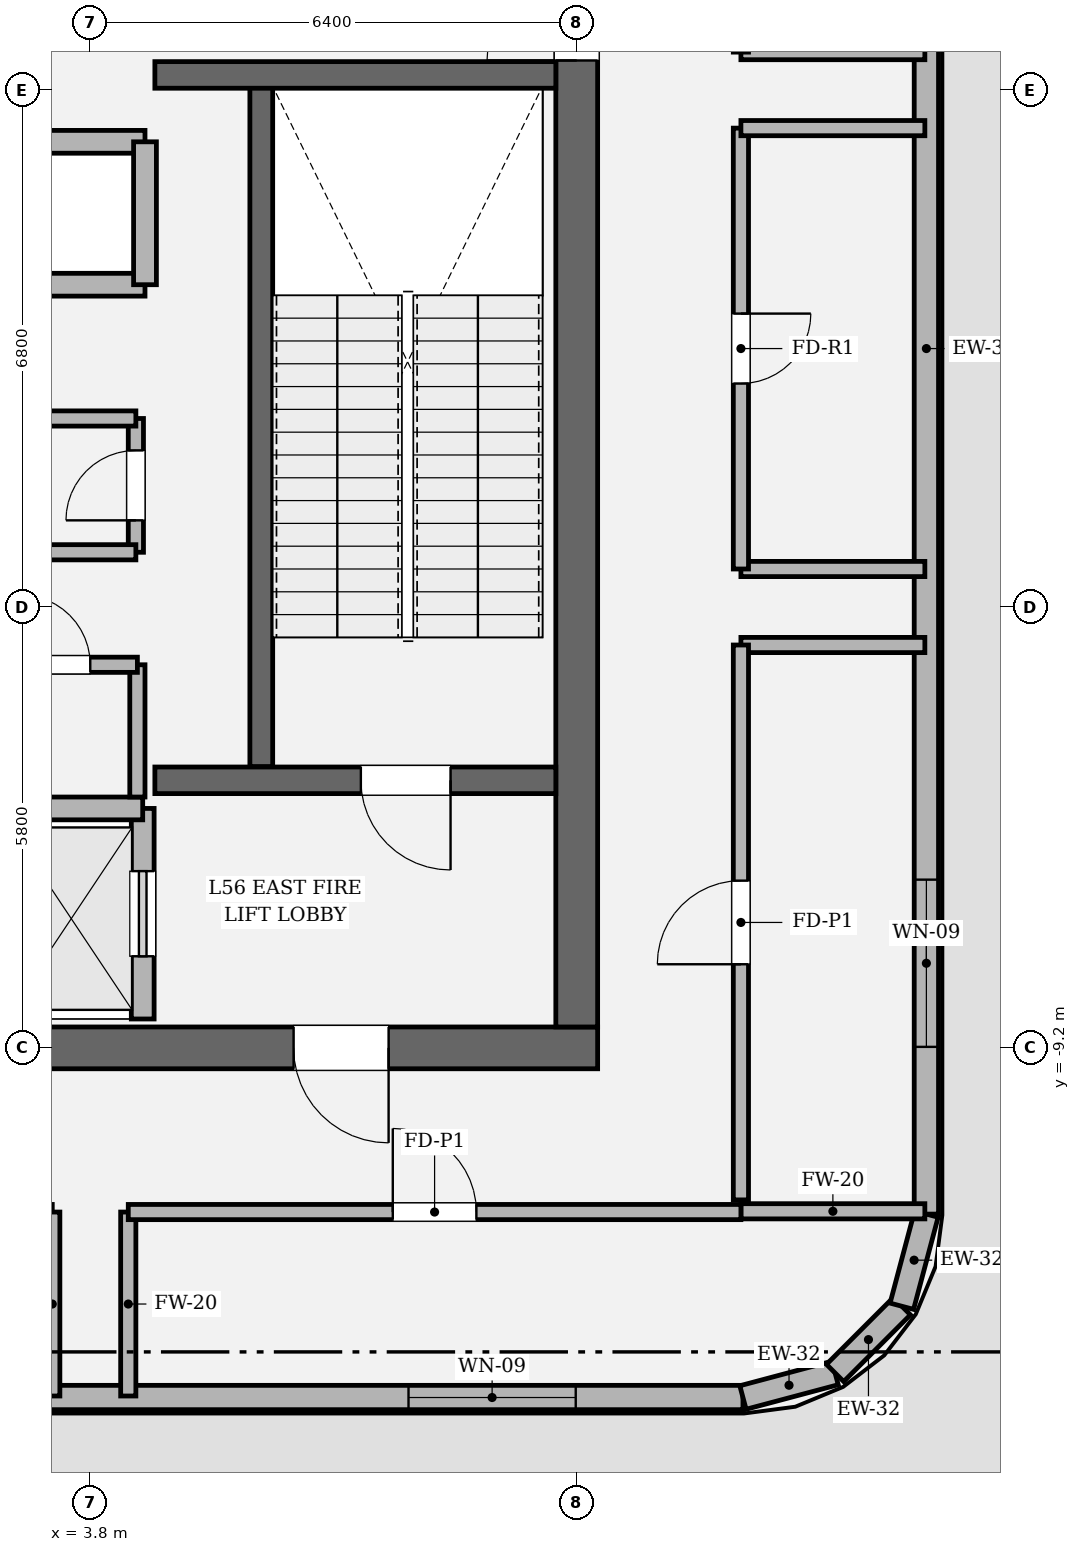
"""IFC4 building model, lengths in metres.
Left out: names, types, materials, properties, quantities, classifications, styles, units other than length and angle.
Written with IfcOpenShell. Run it as: python <this file> out.ifc"""

import sys

from ifc_helpers import new_model, si_unit, direction, frame, frame_2d, origin, place, context, subcontext, project, spatial, rectangle, extrude, element, fill, save


model = new_model("IFC4")
c1 = context("Model", 3, precision=1e-05, world=origin(), true_north=direction((0.0, 1.0)))
c2 = subcontext(c1, "Body", "Model", "MODEL_VIEW")
j1 = project(units=[si_unit("LENGTHUNIT", "METRE"), si_unit("PLANEANGLEUNIT", "RADIAN")], contexts=[c1])
p1 = place(None, origin())
s1 = spatial("IfcSite", under=j1, at=p1, CompositionType="ELEMENT")
p2 = place(p1, origin())
s2 = spatial("IfcBuilding", under=s1, at=p2, CompositionType="ELEMENT")
p3 = place(p2, frame((0.0, 0.0, 237.0)))
s3 = spatial("IfcBuildingStorey", under=s2, at=p3, CompositionType="ELEMENT", Elevation=237.0)
p4 = place(p3, frame((10.475, -9.2, 0.0), z_axis=(0.0, 0.0, 1.0), x_axis=(-1.0, 0.0, 0.0)))
e1 = element("IfcWall", 1, at=p4, inside=s3, PredefinedType="SHEAR", context=c2, shape_type="SweptSolid", body=[
    extrude(rectangle(XDim=20.95, YDim=0.55, at=frame_2d((10.475, 0.0))), origin(), (0.0, 0.0, 1.0), 4.8),
])
p5 = place(p4, frame((2.75, 0.0, 0.0)))
e2 = element("IfcOpeningElement", 2, at=p5, cuts=e1, PredefinedType="OPENING", context=c2, shape_type="SweptSolid", body=[
    extrude(rectangle(XDim=1.25, YDim=2.25, at=frame_2d((0.625, 1.125))), frame((0.0, 0.285, 0.0), z_axis=(0.0, -1.0, 0.0), x_axis=(1.0, 0.0, 0.0)), (0.0, 0.0, 1.0), 0.57),
])
p6 = place(p4, frame((16.95, 0.0, 0.0)))
e3 = element("IfcOpeningElement", 3, at=p6, cuts=e1, PredefinedType="OPENING", context=c2, shape_type="SweptSolid", body=[
    extrude(rectangle(XDim=1.25, YDim=2.25, at=frame_2d((0.625, 1.125))), frame((0.0, 0.285, 0.0), z_axis=(0.0, -1.0, 0.0), x_axis=(1.0, 0.0, 0.0)), (0.0, 0.0, 1.0), 0.57),
])
p7 = place(p3, frame((10.2, 8.925, 0.0), z_axis=(0.0, 0.0, 1.0), x_axis=(0.0, -1.0, 0.0)))
e4 = element("IfcWall", 4, at=p7, inside=s3, PredefinedType="SHEAR", context=c2, shape_type="SweptSolid", body=[
    extrude(rectangle(XDim=17.85, YDim=0.55, at=frame_2d((8.925, 0.0))), origin(), (0.0, 0.0, 1.0), 4.8),
])
p8 = place(p7, frame((3.955, 0.0, 0.0)))
e5 = element("IfcOpeningElement", 5, at=p8, cuts=e4, PredefinedType="OPENING", context=c2, shape_type="SweptSolid", body=[
    extrude(rectangle(XDim=1.18, YDim=2.2, at=frame_2d((0.59, 1.1))), frame((0.0, 0.285, 0.0), z_axis=(0.0, -1.0, 0.0), x_axis=(1.0, 0.0, 0.0)), (0.0, 0.0, 1.0), 0.57),
])
p9 = place(p3, frame((6.05, 3.45, 0.0), z_axis=(0.0, 0.0, 1.0), x_axis=(0.0, -1.0, 0.0)))
e6 = element("IfcWall", 6, at=p9, inside=s3, PredefinedType="SOLIDWALL", context=c2, shape_type="SweptSolid", body=[
    extrude(rectangle(XDim=8.95, YDim=0.3, at=frame_2d((4.475, 0.0))), origin(), (0.0, 0.0, 1.0), 4.8),
])
p10 = place(p3, frame((4.65, -5.68, 0.0), z_axis=(0.0, 0.0, 1.0), x_axis=(1.0, 0.0, 0.0)))
e7 = element("IfcWall", 7, at=p10, inside=s3, PredefinedType="SOLIDWALL", context=c2, shape_type="SweptSolid", body=[
    extrude(rectangle(XDim=5.275, YDim=0.35, at=frame_2d((2.638, 0.0))), origin(), (0.0, 0.0, 1.0), 4.8),
])
p11 = place(p10, frame((2.71, 0.0, 0.0)))
e8 = element("IfcOpeningElement", 8, at=p11, cuts=e7, PredefinedType="OPENING", context=c2, shape_type="SweptSolid", body=[
    extrude(rectangle(XDim=1.18, YDim=2.2, at=frame_2d((0.59, 1.1))), frame((0.0, 0.185, 0.0), z_axis=(0.0, -1.0, 0.0), x_axis=(1.0, 0.0, 0.0)), (0.0, 0.0, 1.0), 0.37),
])
p12 = place(p3, frame((4.65, 3.6, 0.0), z_axis=(0.0, 0.0, 1.0), x_axis=(1.0, 0.0, 0.0)))
e9 = element("IfcWall", 9, at=p12, inside=s3, PredefinedType="SOLIDWALL", context=c2, shape_type="SweptSolid", body=[
    extrude(rectangle(XDim=5.275, YDim=0.35, at=frame_2d((2.638, 0.0))), origin(), (0.0, 0.0, 1.0), 4.8),
])
p13 = place(p3, frame((-12.387, -13.8, 0.0), z_axis=(0.0, 0.0, 1.0), x_axis=(1.0, 0.0, 0.0)))
e10 = element("IfcWall", 10, at=p13, inside=s3, PredefinedType="SOLIDWALL", context=c2, shape_type="SweptSolid", body=[
    extrude(rectangle(XDim=24.774, YDim=0.32, at=frame_2d((12.387, 0.0))), origin(), (0.0, 0.0, 1.0), 3.194),
])
p14 = place(p13, frame((2.2, 0.0, 0.9)))
e11 = element("IfcOpeningElement", 11, at=p14, cuts=e10, PredefinedType="OPENING", context=c2, shape_type="SweptSolid", body=[
    extrude(rectangle(XDim=2.2, YDim=1.2, at=frame_2d((1.1, 0.6))), frame((0.0, 0.17, 0.0), z_axis=(0.0, -1.0, 0.0), x_axis=(1.0, 0.0, 0.0)), (0.0, 0.0, 1.0), 0.34),
])
p15 = place(p13, frame((20.374, 0.0, 0.9)))
e12 = element("IfcOpeningElement", 12, at=p15, cuts=e10, PredefinedType="OPENING", context=c2, shape_type="SweptSolid", body=[
    extrude(rectangle(XDim=2.2, YDim=1.2, at=frame_2d((1.1, 0.6))), frame((0.0, 0.17, 0.0), z_axis=(0.0, -1.0, 0.0), x_axis=(1.0, 0.0, 0.0)), (0.0, 0.0, 1.0), 0.34),
])
p16 = place(p3, frame((12.387, -13.8, 0.0), z_axis=(0.0, 0.0, 1.0), x_axis=(0.966283375382, 0.25748094776, 0.0)))
e13 = element("IfcWall", 13, at=p16, inside=s3, PredefinedType="SOLIDWALL", context=c2, shape_type="SweptSolid", body=[
    extrude(rectangle(XDim=1.254, YDim=0.32, at=frame_2d((0.627, 0.0))), origin(), (0.0, 0.0, 1.0), 3.194),
])
p17 = place(p3, frame((13.599, -13.477, 0.0), z_axis=(0.0, 0.0, 1.0), x_axis=(0.707106781187, 0.707106781187, 0.0)))
e14 = element("IfcWall", 14, at=p17, inside=s3, PredefinedType="SOLIDWALL", context=c2, shape_type="SweptSolid", body=[
    extrude(rectangle(XDim=1.242, YDim=0.32, at=frame_2d((0.621, 0.0))), origin(), (0.0, 0.0, 1.0), 3.194),
])
p18 = place(p3, frame((14.477, -12.599, 0.0), z_axis=(0.0, 0.0, 1.0), x_axis=(0.25748094776, 0.966283375382, 0.0)))
e15 = element("IfcWall", 15, at=p18, inside=s3, PredefinedType="SOLIDWALL", context=c2, shape_type="SweptSolid", body=[
    extrude(rectangle(XDim=1.254, YDim=0.32, at=frame_2d((0.627, 0.0))), origin(), (0.0, 0.0, 1.0), 3.194),
])
p19 = place(p3, frame((14.8, -11.387, 0.0), z_axis=(0.0, 0.0, 1.0), x_axis=(0.0, 1.0, 0.0)))
e16 = element("IfcWall", 16, at=p19, inside=s3, PredefinedType="SOLIDWALL", context=c2, shape_type="SweptSolid", body=[
    extrude(rectangle(XDim=22.774, YDim=0.32, at=frame_2d((11.387, 0.0))), origin(), (0.0, 0.0, 1.0), 3.194),
])
p20 = place(p19, frame((2.2, 0.0, 0.9)))
e17 = element("IfcOpeningElement", 17, at=p20, cuts=e16, PredefinedType="OPENING", context=c2, shape_type="SweptSolid", body=[
    extrude(rectangle(XDim=2.2, YDim=1.2, at=frame_2d((1.1, 0.6))), frame((0.0, 0.17, 0.0), z_axis=(0.0, -1.0, 0.0), x_axis=(1.0, 0.0, 0.0)), (0.0, 0.0, 1.0), 0.34),
])
p21 = place(p19, frame((18.374, 0.0, 0.9)))
e18 = element("IfcOpeningElement", 18, at=p21, cuts=e16, PredefinedType="OPENING", context=c2, shape_type="SweptSolid", body=[
    extrude(rectangle(XDim=2.2, YDim=1.2, at=frame_2d((1.1, 0.6))), frame((0.0, 0.17, 0.0), z_axis=(0.0, -1.0, 0.0), x_axis=(1.0, 0.0, 0.0)), (0.0, 0.0, 1.0), 0.34),
])
p22 = place(p3, frame((4.49, -8.82, 0.0), z_axis=(0.0, 0.0, 1.0), x_axis=(0.0, 1.0, 0.0)))
e19 = element("IfcWall", 19, at=p22, inside=s3, PredefinedType="SOLIDWALL", context=c2, shape_type="SweptSolid", body=[
    extrude(rectangle(XDim=2.77, YDim=0.3, at=frame_2d((1.385, 0.0))), origin(), (0.0, 0.0, 1.0), 4.48),
])
p23 = place(p22, frame((0.825, 0.0, 0.0)))
e20 = element("IfcOpeningElement", 20, at=p23, cuts=e19, PredefinedType="OPENING", context=c2, shape_type="SweptSolid", body=[
    extrude(rectangle(XDim=1.12, YDim=2.25, at=frame_2d((0.56, 1.125))), frame((0.0, 0.16, 0.0), z_axis=(0.0, -1.0, 0.0), x_axis=(1.0, 0.0, 0.0)), (0.0, 0.0, 1.0), 0.32),
])
p24 = place(p3, frame((2.61, -6.05, 0.0), z_axis=(0.0, 0.0, 1.0), x_axis=(1.0, 0.0, 0.0)))
e21 = element("IfcWall", 21, at=p24, inside=s3, PredefinedType="SOLIDWALL", context=c2, shape_type="SweptSolid", body=[
    extrude(rectangle(XDim=1.88, YDim=0.3, at=frame_2d((0.94, 0.0))), origin(), (0.0, 0.0, 1.0), 4.48),
])
for number, where, z_axis, x_axis in (
    (22, (-4.52, 0.84, 0.0), (0.0, 0.0, 1.0), (1.0, 0.0, 0.0)),
    (23, (-4.52, 2.72, 0.0), (0.0, 0.0, 1.0), (1.0, 0.0, 0.0)),
):
    element("IfcWall", number, at=place(p3, frame(where, z_axis=z_axis, x_axis=x_axis)), inside=s3, PredefinedType="SOLIDWALL", context=c2, shape_type="SweptSolid", body=[
        extrude(rectangle(XDim=9.04, YDim=0.3, at=frame_2d((4.52, 0.0))), origin(), (0.0, 0.0, 1.0), 4.48),
    ])
p25 = place(p3, frame((4.52, 0.84, 0.0), z_axis=(0.0, 0.0, 1.0), x_axis=(0.0, 1.0, 0.0)))
e24 = element("IfcWall", 24, at=p25, inside=s3, PredefinedType="SOLIDWALL", context=c2, shape_type="SweptSolid", body=[
    extrude(rectangle(XDim=1.88, YDim=0.3, at=frame_2d((0.94, 0.0))), origin(), (0.0, 0.0, 1.0), 4.48),
])
p26 = place(p3, frame((4.42, -5.9, 0.0), z_axis=(0.0, 0.0, 1.0), x_axis=(0.0, 1.0, 0.0)))
e25 = element("IfcWall", 25, at=p26, inside=s3, PredefinedType="SOLIDWALL", context=c2, shape_type="SweptSolid", body=[
    extrude(rectangle(XDim=1.74, YDim=0.2, at=frame_2d((0.87, 0.0))), origin(), (0.0, 0.0, 1.0), 4.48),
])
p27 = place(p3, frame((4.42, -4.16, 0.0), z_axis=(0.0, 0.0, 1.0), x_axis=(-1.0, 0.0, 0.0)))
e26 = element("IfcWall", 26, at=p27, inside=s3, PredefinedType="SOLIDWALL", context=c2, shape_type="SweptSolid", body=[
    extrude(rectangle(XDim=2.16, YDim=0.2, at=frame_2d((1.08, 0.0))), origin(), (0.0, 0.0, 1.0), 4.48),
])
p28 = place(p27, frame((0.62, 0.0, 0.0)))
e27 = element("IfcOpeningElement", 27, at=p28, cuts=e26, PredefinedType="OPENING", context=c2, shape_type="SweptSolid", body=[
    extrude(rectangle(XDim=0.92, YDim=2.1, at=frame_2d((0.46, 1.05))), frame((0.0, 0.11, 0.0), z_axis=(0.0, -1.0, 0.0), x_axis=(1.0, 0.0, 0.0)), (0.0, 0.0, 1.0), 0.22),
])
p29 = place(p3, frame((4.4, -2.68, 0.0), z_axis=(0.0, 0.0, 1.0), x_axis=(0.0, 1.0, 0.0)))
e28 = element("IfcWall", 28, at=p29, inside=s3, PredefinedType="SOLIDWALL", context=c2, shape_type="SweptSolid", body=[
    extrude(rectangle(XDim=1.76, YDim=0.2, at=frame_2d((0.88, 0.0))), origin(), (0.0, 0.0, 1.0), 4.48),
])
p30 = place(p29, frame((0.42, 0.0, 0.0)))
e29 = element("IfcOpeningElement", 29, at=p30, cuts=e28, PredefinedType="OPENING", context=c2, shape_type="SweptSolid", body=[
    extrude(rectangle(XDim=0.92, YDim=2.1, at=frame_2d((0.46, 1.05))), frame((0.0, 0.11, 0.0), z_axis=(0.0, -1.0, 0.0), x_axis=(1.0, 0.0, 0.0)), (0.0, 0.0, 1.0), 0.22),
])
for number, where, z_axis, x_axis in (
    (30, (4.4, -0.92, 0.0), (0.0, 0.0, 1.0), (-1.0, 0.0, 0.0)),
    (31, (-4.4, -2.68, 0.0), (0.0, 0.0, 1.0), (1.0, 0.0, 0.0)),
):
    element("IfcWall", number, at=place(p3, frame(where, z_axis=z_axis, x_axis=x_axis)), inside=s3, PredefinedType="SOLIDWALL", context=c2, shape_type="SweptSolid", body=[
        extrude(rectangle(XDim=8.8, YDim=0.2, at=frame_2d((4.4, 0.0))), origin(), (0.0, 0.0, 1.0), 4.48),
    ])
for number, where, z_axis, x_axis in (
    (32, (3.3, -11.36, 0.0), (0.0, 0.0, 1.0), (0.0, -1.0, 0.0)),
    (33, (12.36, -11.35, 0.0), (0.0, 0.0, 1.0), (1.0, 0.0, 0.0)),
    (34, (4.3, -13.78, 0.0), (0.0, 0.0, 1.0), (0.0, 1.0, 0.0)),
):
    element("IfcWall", number, at=place(p3, frame(where, z_axis=z_axis, x_axis=x_axis)), inside=s3, PredefinedType="SOLIDWALL", context=c2, shape_type="SweptSolid", body=[
        extrude(rectangle(XDim=2.42, YDim=0.2, at=frame_2d((1.21, 0.0))), origin(), (0.0, 0.0, 1.0), 3.194),
    ])
p31 = place(p3, frame((4.3, -11.36, 0.0), z_axis=(0.0, 0.0, 1.0), x_axis=(1.0, 0.0, 0.0)))
e35 = element("IfcWall", 35, at=p31, inside=s3, PredefinedType="SOLIDWALL", context=c2, shape_type="SweptSolid", body=[
    extrude(rectangle(XDim=8.06, YDim=0.2, at=frame_2d((4.03, 0.0))), origin(), (0.0, 0.0, 1.0), 4.48),
])
p32 = place(p31, frame((3.48, 0.0, 0.0)))
e36 = element("IfcOpeningElement", 36, at=p32, cuts=e35, PredefinedType="OPENING", context=c2, shape_type="SweptSolid", body=[
    extrude(rectangle(XDim=1.1, YDim=2.2, at=frame_2d((0.55, 1.1))), frame((0.0, 0.11, 0.0), z_axis=(0.0, -1.0, 0.0), x_axis=(1.0, 0.0, 0.0)), (0.0, 0.0, 1.0), 0.22),
])
p33 = place(p3, frame((12.36, -3.9, 0.0), z_axis=(0.0, 0.0, 1.0), x_axis=(1.0, 0.0, 0.0)))
e37 = element("IfcWall", 37, at=p33, inside=s3, PredefinedType="SOLIDWALL", context=c2, shape_type="SweptSolid", body=[
    extrude(rectangle(XDim=2.42, YDim=0.2, at=frame_2d((1.21, 0.0))), origin(), (0.0, 0.0, 1.0), 3.194),
])
p34 = place(p3, frame((12.36, -11.2, 0.0), z_axis=(0.0, 0.0, 1.0), x_axis=(0.0, 1.0, 0.0)))
e38 = element("IfcWall", 38, at=p34, inside=s3, PredefinedType="SOLIDWALL", context=c2, shape_type="SweptSolid", body=[
    extrude(rectangle(XDim=7.3, YDim=0.2, at=frame_2d((3.65, 0.0))), origin(), (0.0, 0.0, 1.0), 4.48),
])
p35 = place(p34, frame((3.1, 0.0, 0.0)))
e39 = element("IfcOpeningElement", 39, at=p35, cuts=e38, PredefinedType="OPENING", context=c2, shape_type="SweptSolid", body=[
    extrude(rectangle(XDim=1.1, YDim=2.2, at=frame_2d((0.55, 1.1))), frame((0.0, 0.11, 0.0), z_axis=(0.0, -1.0, 0.0), x_axis=(1.0, 0.0, 0.0)), (0.0, 0.0, 1.0), 0.22),
])
p36 = place(p3, frame((14.78, -2.9, 0.0), z_axis=(0.0, 0.0, 1.0), x_axis=(-1.0, 0.0, 0.0)))
e40 = element("IfcWall", 40, at=p36, inside=s3, PredefinedType="SOLIDWALL", context=c2, shape_type="SweptSolid", body=[
    extrude(rectangle(XDim=2.42, YDim=0.2, at=frame_2d((1.21, 0.0))), origin(), (0.0, 0.0, 1.0), 3.194),
])
p37 = place(p3, frame((12.36, -2.9, 0.0), z_axis=(0.0, 0.0, 1.0), x_axis=(0.0, 1.0, 0.0)))
e41 = element("IfcWall", 41, at=p37, inside=s3, PredefinedType="SOLIDWALL", context=c2, shape_type="SweptSolid", body=[
    extrude(rectangle(XDim=5.8, YDim=0.2, at=frame_2d((2.9, 0.0))), origin(), (0.0, 0.0, 1.0), 4.48),
])
p38 = place(p37, frame((2.44, 0.0, 0.0)))
e42 = element("IfcOpeningElement", 42, at=p38, cuts=e41, PredefinedType="OPENING", context=c2, shape_type="SweptSolid", body=[
    extrude(rectangle(XDim=0.92, YDim=2.1, at=frame_2d((0.46, 1.05))), frame((0.0, 0.11, 0.0), z_axis=(0.0, -1.0, 0.0), x_axis=(1.0, 0.0, 0.0)), (0.0, 0.0, 1.0), 0.22),
])
for number, where, z_axis, x_axis in (
    (43, (12.36, 2.9, 0.0), (0.0, 0.0, 1.0), (1.0, 0.0, 0.0)),
    (44, (14.78, 3.9, 0.0), (0.0, 0.0, 1.0), (-1.0, 0.0, 0.0)),
):
    element("IfcWall", number, at=place(p3, frame(where, z_axis=z_axis, x_axis=x_axis)), inside=s3, PredefinedType="SOLIDWALL", context=c2, shape_type="SweptSolid", body=[
        extrude(rectangle(XDim=2.42, YDim=0.2, at=frame_2d((1.21, 0.0))), origin(), (0.0, 0.0, 1.0), 3.194),
    ])
p39 = place(p3, frame((12.36, 3.9, 0.0), z_axis=(0.0, 0.0, 1.0), x_axis=(0.0, 1.0, 0.0)))
e45 = element("IfcWall", 45, at=p39, inside=s3, PredefinedType="SOLIDWALL", context=c2, shape_type="SweptSolid", body=[
    extrude(rectangle(XDim=7.3, YDim=0.2, at=frame_2d((3.65, 0.0))), origin(), (0.0, 0.0, 1.0), 4.48),
])
p40 = place(p39, frame((3.1, 0.0, 0.0)))
e46 = element("IfcOpeningElement", 46, at=p40, cuts=e45, PredefinedType="OPENING", context=c2, shape_type="SweptSolid", body=[
    extrude(rectangle(XDim=1.1, YDim=2.2, at=frame_2d((0.55, 1.1))), frame((0.0, 0.11, 0.0), z_axis=(0.0, -1.0, 0.0), x_axis=(1.0, 0.0, 0.0)), (0.0, 0.0, 1.0), 0.22),
])
p41 = place(p15, origin())
e47 = element("IfcWindow", 47, at=p41, inside=s3, PartitioningType="SINGLE_PANEL", PredefinedType="WINDOW", context=c2, shape_type="SweptSolid", body=[
    extrude(rectangle(XDim=2.2, YDim=1.2, at=frame_2d((1.1, 0.6))), frame((0.0, 0.03, 0.0), z_axis=(0.0, -1.0, 0.0), x_axis=(1.0, 0.0, 0.0)), (0.0, 0.0, 1.0), 0.06),
])
fill(e12, e47)
p42 = place(p20, origin())
e48 = element("IfcWindow", 48, at=p42, inside=s3, PartitioningType="SINGLE_PANEL", PredefinedType="WINDOW", context=c2, shape_type="SweptSolid", body=[
    extrude(rectangle(XDim=2.2, YDim=1.2, at=frame_2d((1.1, 0.6))), frame((0.0, 0.03, 0.0), z_axis=(0.0, -1.0, 0.0), x_axis=(1.0, 0.0, 0.0)), (0.0, 0.0, 1.0), 0.06),
])
fill(e17, e48)
p43 = place(p11, origin())
e49 = element("IfcDoor", 49, at=p43, inside=s3, OperationType="SINGLE_SWING_RIGHT", PredefinedType="DOOR", context=c2, shape_type="SweptSolid", body=[
    extrude(rectangle(XDim=1.18, YDim=2.2, at=frame_2d((0.59, 1.1))), frame((0.0, 0.025, 0.0), z_axis=(0.0, -1.0, 0.0), x_axis=(1.0, 0.0, 0.0)), (0.0, 0.0, 1.0), 0.05),
])
fill(e8, e49)
p44 = place(p5, origin())
e50 = element("IfcDoor", 50, at=p44, inside=s3, OperationType="SINGLE_SWING_LEFT", PredefinedType="DOOR", context=c2, shape_type="SweptSolid", body=[
    extrude(rectangle(XDim=1.25, YDim=2.25, at=frame_2d((0.625, 1.125))), frame((0.0, 0.025, 0.0), z_axis=(0.0, -1.0, 0.0), x_axis=(1.0, 0.0, 0.0)), (0.0, 0.0, 1.0), 0.05),
])
fill(e2, e50)
p45 = place(p8, origin())
e51 = element("IfcDoor", 51, at=p45, inside=s3, OperationType="SINGLE_SWING_RIGHT", PredefinedType="DOOR", context=c2, shape_type="SweptSolid", body=[
    extrude(rectangle(XDim=1.18, YDim=2.2, at=frame_2d((0.59, 1.1))), frame((0.0, 0.025, 0.0), z_axis=(0.0, -1.0, 0.0), x_axis=(1.0, 0.0, 0.0)), (0.0, 0.0, 1.0), 0.05),
])
fill(e5, e51)
p46 = place(p23, origin())
e52 = element("IfcDoor", 52, at=p46, inside=s3, OperationType="SLIDING_TO_RIGHT", PredefinedType="DOOR", context=c2, shape_type="SweptSolid", body=[
    extrude(rectangle(XDim=1.12, YDim=2.25, at=frame_2d((0.56, 1.125))), frame((0.0, 0.025, 0.0), z_axis=(0.0, -1.0, 0.0), x_axis=(1.0, 0.0, 0.0)), (0.0, 0.0, 1.0), 0.05),
])
fill(e20, e52)
p47 = place(p28, origin())
e53 = element("IfcDoor", 53, at=p47, inside=s3, OperationType="SINGLE_SWING_RIGHT", PredefinedType="DOOR", context=c2, shape_type="SweptSolid", body=[
    extrude(rectangle(XDim=0.92, YDim=2.1, at=frame_2d((0.46, 1.05))), frame((0.0, 0.025, 0.0), z_axis=(0.0, -1.0, 0.0), x_axis=(1.0, 0.0, 0.0)), (0.0, 0.0, 1.0), 0.05),
])
fill(e27, e53)
p48 = place(p30, origin())
e54 = element("IfcDoor", 54, at=p48, inside=s3, OperationType="SINGLE_SWING_LEFT", PredefinedType="DOOR", context=c2, shape_type="SweptSolid", body=[
    extrude(rectangle(XDim=0.92, YDim=2.1, at=frame_2d((0.46, 1.05))), frame((0.0, 0.025, 0.0), z_axis=(0.0, -1.0, 0.0), x_axis=(1.0, 0.0, 0.0)), (0.0, 0.0, 1.0), 0.05),
])
fill(e29, e54)
p49 = place(p32, origin())
e55 = element("IfcDoor", 55, at=p49, inside=s3, OperationType="SINGLE_SWING_LEFT", PredefinedType="DOOR", context=c2, shape_type="SweptSolid", body=[
    extrude(rectangle(XDim=1.1, YDim=2.2, at=frame_2d((0.55, 1.1))), frame((0.0, 0.025, 0.0), z_axis=(0.0, -1.0, 0.0), x_axis=(1.0, 0.0, 0.0)), (0.0, 0.0, 1.0), 0.05),
])
fill(e36, e55)
p50 = place(p35, origin())
e56 = element("IfcDoor", 56, at=p50, inside=s3, OperationType="SINGLE_SWING_LEFT", PredefinedType="DOOR", context=c2, shape_type="SweptSolid", body=[
    extrude(rectangle(XDim=1.1, YDim=2.2, at=frame_2d((0.55, 1.1))), frame((0.0, 0.025, 0.0), z_axis=(0.0, -1.0, 0.0), x_axis=(1.0, 0.0, 0.0)), (0.0, 0.0, 1.0), 0.05),
])
fill(e39, e56)
p51 = place(p38, origin())
e57 = element("IfcDoor", 57, at=p51, inside=s3, OperationType="SINGLE_SWING_RIGHT", PredefinedType="DOOR", context=c2, shape_type="SweptSolid", body=[
    extrude(rectangle(XDim=0.92, YDim=2.1, at=frame_2d((0.46, 1.05))), frame((0.0, 0.025, 0.0), z_axis=(0.0, -1.0, 0.0), x_axis=(1.0, 0.0, 0.0)), (0.0, 0.0, 1.0), 0.05),
])
fill(e42, e57)
save(model, sys.argv[1])
